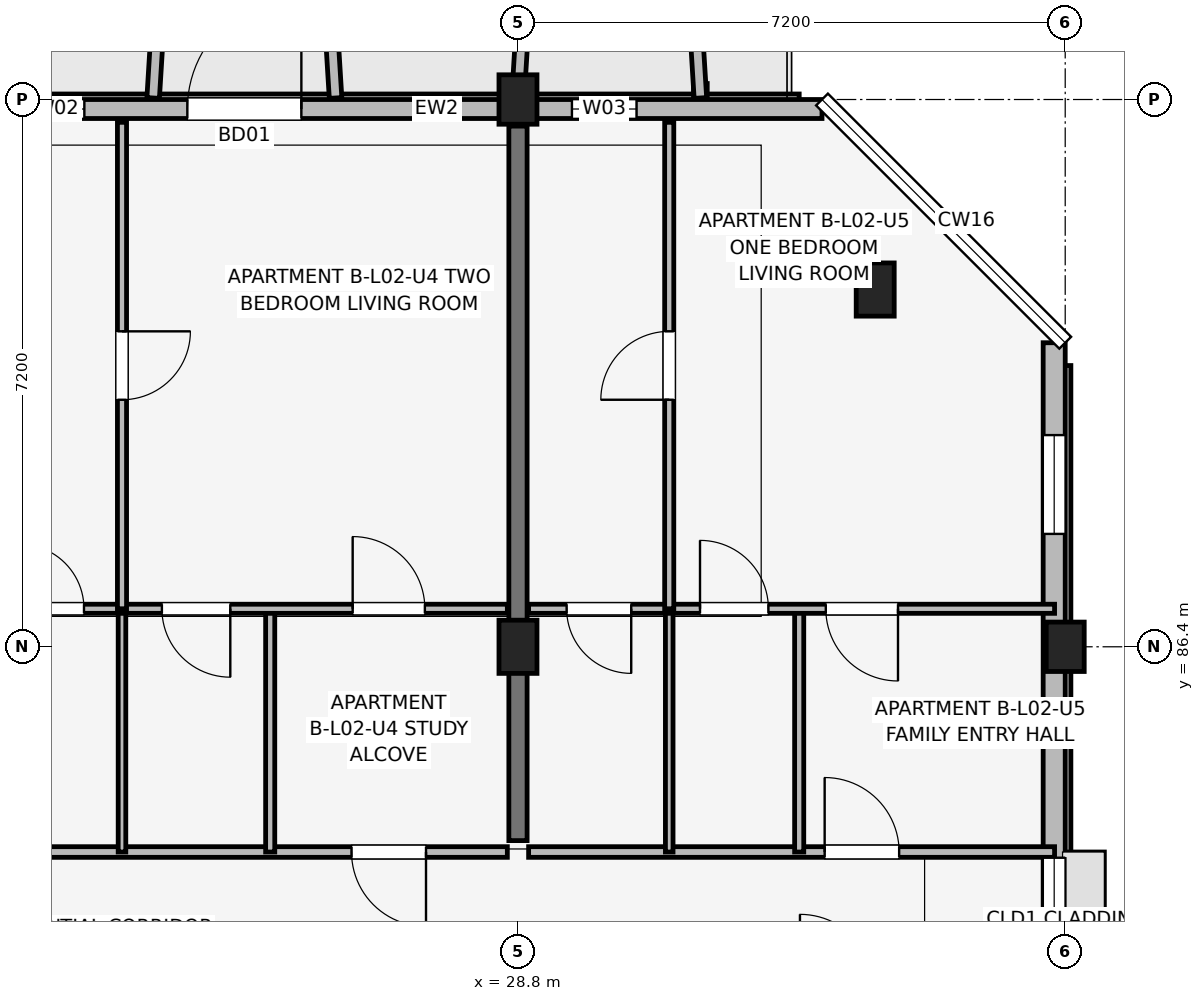
"""IFC4 building model, lengths in metres.
Left out: names, types, materials, properties, quantities, classifications, styles, units other than length and angle.
Written with IfcOpenShell. Run it as: python <this file> out.ifc"""

import sys

from ifc_helpers import new_model, si_unit, direction, frame, frame_2d, origin, origin_2d, place, context, subcontext, project, spatial, rectangle, extrude, element, fill, save


model = new_model("IFC4")
c1 = context("Model", 3, precision=1e-05, world=origin(), true_north=direction((0.0, 1.0)))
c2 = subcontext(c1, "Body", "Model", "MODEL_VIEW")
j1 = project(units=[si_unit("LENGTHUNIT", "METRE"), si_unit("PLANEANGLEUNIT", "RADIAN")], contexts=[c1])
p1 = place(None, origin())
s1 = spatial("IfcSite", under=j1, at=p1, CompositionType="ELEMENT")
p2 = place(p1, origin())
s2 = spatial("IfcBuilding", under=s1, at=p2, CompositionType="ELEMENT")
p3 = place(p2, frame((0.0, 0.0, 8.7)))
s3 = spatial("IfcBuildingStorey", under=s2, at=p3, CompositionType="ELEMENT", Elevation=8.7)
p4 = place(p3, frame((28.8, 86.4, 0.0), z_axis=(0.0, 0.0, 1.0), x_axis=(1.0, 0.0, 0.0)))
e1 = element("IfcColumn", 1, at=p4, inside=s3, PredefinedType="COLUMN", context=c2, shape_type="SweptSolid", body=[
    extrude(rectangle(XDim=0.5, YDim=0.7, at=origin_2d()), origin(), (0.0, 0.0, 1.0), 3.15),
])
for number, where, z_axis, x_axis in (
    (2, (28.8, 93.6, 0.0), (0.0, 0.0, 1.0), (1.0, 0.0, 0.0)),
    (3, (36.0, 86.4, 0.0), (0.0, 0.0, 1.0), (1.0, 0.0, 0.0)),
):
    element("IfcColumn", number, at=place(p3, frame(where, z_axis=z_axis, x_axis=x_axis)), inside=s3, PredefinedType="COLUMN", context=c2, shape_type="SweptSolid", body=[
        extrude(rectangle(XDim=0.5, YDim=0.65, at=origin_2d()), origin(), (0.0, 0.0, 1.0), 3.15),
    ])
p5 = place(p3, frame((33.5, 91.1, 0.0), z_axis=(0.0, 0.0, 1.0), x_axis=(1.0, 0.0, 0.0)))
e4 = element("IfcColumn", 4, at=p5, inside=s3, PredefinedType="COLUMN", context=c2, shape_type="SweptSolid", body=[
    extrude(rectangle(XDim=0.5, YDim=0.7, at=origin_2d()), origin(), (0.0, 0.0, 1.0), 3.15),
])
p6 = place(p3, frame((28.8, 83.85, 0.0), z_axis=(0.0, 0.0, 1.0), x_axis=(0.0, 1.0, 0.0)))
e5 = element("IfcWall", 5, at=p6, inside=s3, PredefinedType="SHEAR", context=c2, shape_type="SweptSolid", body=[
    extrude(rectangle(XDim=9.4, YDim=0.24, at=frame_2d((4.7, 0.0))), origin(), (0.0, 0.0, 1.0), 3.15),
])
p7 = place(p3, frame((35.855, 75.2, 0.0), z_axis=(0.0, 0.0, 1.0), x_axis=(0.0, 1.0, 0.0)))
e6 = element("IfcWall", 6, at=p7, inside=s3, PredefinedType="SOLIDWALL", context=c2, shape_type="SweptSolid", body=[
    extrude(rectangle(XDim=15.2, YDim=0.29, at=frame_2d((7.6, 0.0))), origin(), (0.0, 0.0, 1.0), 2.38),
])
p8 = place(p7, frame((6.775, 0.0, 1.05)))
e7 = element("IfcOpeningElement", 7, at=p8, cuts=e6, PredefinedType="OPENING", context=c2, shape_type="SweptSolid", body=[
    extrude(rectangle(XDim=1.65, YDim=1.15, at=frame_2d((0.825, 0.575))), frame((0.0, 0.155, 0.0), z_axis=(0.0, -1.0, 0.0), x_axis=(1.0, 0.0, 0.0)), (0.0, 0.0, 1.0), 0.31),
])
p9 = place(p7, frame((12.685, 0.0, 0.72)))
e8 = element("IfcOpeningElement", 8, at=p9, cuts=e6, PredefinedType="OPENING", context=c2, shape_type="SweptSolid", body=[
    extrude(rectangle(XDim=1.3, YDim=1.55, at=frame_2d((0.65, 0.775))), frame((0.0, 0.155, 0.0), z_axis=(0.0, -1.0, 0.0), x_axis=(1.0, 0.0, 0.0)), (0.0, 0.0, 1.0), 0.31),
])
p10 = place(p3, frame((32.8, 93.475, 0.0), z_axis=(0.0, 0.0, 1.0), x_axis=(-1.0, 0.0, 0.0)))
e9 = element("IfcWall", 9, at=p10, inside=s3, PredefinedType="SOLIDWALL", context=c2, shape_type="SweptSolid", body=[
    extrude(rectangle(XDim=29.6, YDim=0.25, at=frame_2d((14.8, 0.0))), origin(), (0.0, 0.0, 1.0), 2.43),
])
p11 = place(p10, frame((22.825, 0.0, 0.0), z_axis=(0.0, 0.0, 1.0), x_axis=(-1.0, 0.0, 0.0)))
e10 = element("IfcOpeningElement", 10, at=p11, cuts=e9, PredefinedType="OPENING", context=c2, shape_type="SweptSolid", body=[
    extrude(rectangle(XDim=1.65, YDim=2.15, at=frame_2d((0.825, 1.075))), frame((0.0, 0.135, 0.0), z_axis=(0.0, -1.0, 0.0), x_axis=(1.0, 0.0, 0.0)), (0.0, 0.0, 1.0), 0.27),
])
p12 = place(p10, frame((8.35, 0.0, 0.0), z_axis=(0.0, 0.0, 1.0), x_axis=(-1.0, 0.0, 0.0)))
e11 = element("IfcOpeningElement", 11, at=p12, cuts=e9, PredefinedType="OPENING", context=c2, shape_type="SweptSolid", body=[
    extrude(rectangle(XDim=1.5, YDim=2.15, at=frame_2d((0.75, 1.075))), frame((0.0, 0.135, 0.0), z_axis=(0.0, -1.0, 0.0), x_axis=(1.0, 0.0, 0.0)), (0.0, 0.0, 1.0), 0.27),
])
p13 = place(p10, frame((26.025, 0.0, 0.75)))
e12 = element("IfcOpeningElement", 12, at=p13, cuts=e9, PredefinedType="OPENING", context=c2, shape_type="SweptSolid", body=[
    extrude(rectangle(XDim=1.22, YDim=1.5, at=frame_2d((0.61, 0.75))), frame((0.0, 0.135, 0.0), z_axis=(0.0, -1.0, 0.0), x_axis=(1.0, 0.0, 0.0)), (0.0, 0.0, 1.0), 0.27),
])
p14 = place(p10, frame((23.795, 0.0, 0.75)))
e13 = element("IfcOpeningElement", 13, at=p14, cuts=e9, PredefinedType="OPENING", context=c2, shape_type="SweptSolid", body=[
    extrude(rectangle(XDim=1.34, YDim=1.55, at=frame_2d((0.67, 0.775))), frame((0.0, 0.135, 0.0), z_axis=(0.0, -1.0, 0.0), x_axis=(1.0, 0.0, 0.0)), (0.0, 0.0, 1.0), 0.27),
])
p15 = place(p10, frame((16.265, 0.0, 0.7)))
e14 = element("IfcOpeningElement", 14, at=p15, cuts=e9, PredefinedType="OPENING", context=c2, shape_type="SweptSolid", body=[
    extrude(rectangle(XDim=1.58, YDim=1.6, at=frame_2d((0.79, 0.8))), frame((0.0, 0.135, 0.0), z_axis=(0.0, -1.0, 0.0), x_axis=(1.0, 0.0, 0.0)), (0.0, 0.0, 1.0), 0.27),
])
p16 = place(p10, frame((12.245, 0.0, 0.75)))
e15 = element("IfcOpeningElement", 15, at=p16, cuts=e9, PredefinedType="OPENING", context=c2, shape_type="SweptSolid", body=[
    extrude(rectangle(XDim=0.6, YDim=1.25, at=frame_2d((0.3, 0.625))), frame((0.0, 0.135, 0.0), z_axis=(0.0, -1.0, 0.0), x_axis=(1.0, 0.0, 0.0)), (0.0, 0.0, 1.0), 0.27),
])
p17 = place(p10, frame((9.705, 0.0, 0.75)))
e16 = element("IfcOpeningElement", 16, at=p17, cuts=e9, PredefinedType="OPENING", context=c2, shape_type="SweptSolid", body=[
    extrude(rectangle(XDim=0.72, YDim=1.35, at=frame_2d((0.36, 0.675))), frame((0.0, 0.135, 0.0), z_axis=(0.0, -1.0, 0.0), x_axis=(1.0, 0.0, 0.0)), (0.0, 0.0, 1.0), 0.27),
])
p18 = place(p10, frame((2.44, 0.0, 0.75)))
e17 = element("IfcOpeningElement", 17, at=p18, cuts=e9, PredefinedType="OPENING", context=c2, shape_type="SweptSolid", body=[
    extrude(rectangle(XDim=0.85, YDim=1.4, at=frame_2d((0.425, 0.7))), frame((0.0, 0.135, 0.0), z_axis=(0.0, -1.0, 0.0), x_axis=(1.0, 0.0, 0.0)), (0.0, 0.0, 1.0), 0.27),
])
for number, where, z_axis, x_axis in (
    (18, (24.0, 93.62, 0.0), (0.0, 0.0, 1.0), (0.061, 0.998, 0.0)),
    (19, (26.4, 93.62, 0.0), (0.0, 0.0, 1.0), (-0.061, 0.998, 0.0)),
):
    element("IfcWall", number, at=place(p3, frame(where, z_axis=z_axis, x_axis=x_axis)), inside=s3, PredefinedType="ELEMENTEDWALL", context=c2, shape_type="SweptSolid", body=[
        extrude(rectangle(XDim=1.964, YDim=0.165, at=frame_2d((0.982, 0.0))), origin(), (0.0, 0.0, 1.0), 2.45),
    ])
for number, where, z_axis, x_axis in (
    (20, (28.8, 93.62, 0.0), (0.0, 0.0, 1.0), (0.061, 0.998, 0.0)),
    (21, (31.2, 93.62, 0.0), (0.0, 0.0, 1.0), (-0.061, 0.998, 0.0)),
):
    element("IfcWall", number, at=place(p3, frame(where, z_axis=z_axis, x_axis=x_axis)), inside=s3, PredefinedType="ELEMENTEDWALL", context=c2, shape_type="SweptSolid", body=[
        extrude(rectangle(XDim=1.964, YDim=0.165, at=frame_2d((0.982, 0.0))), origin(), (0.0, 0.0, 1.0), 2.95),
    ])
p19 = place(p3, frame((21.74, 83.7, 0.0), z_axis=(0.0, 0.0, 1.0), x_axis=(1.0, 0.0, 0.0)))
e22 = element("IfcWall", 22, at=p19, inside=s3, PredefinedType="PARTITIONING", context=c2, shape_type="SweptSolid", body=[
    extrude(rectangle(XDim=6.92, YDim=0.14, at=frame_2d((3.46, 0.0))), origin(), (0.0, 0.0, 1.0), 2.38),
])
p20 = place(p19, frame((5.85, 0.0, 0.0), z_axis=(0.0, 0.0, 1.0), x_axis=(-1.0, 0.0, 0.0)))
e23 = element("IfcOpeningElement", 23, at=p20, cuts=e22, PredefinedType="OPENING", context=c2, shape_type="SweptSolid", body=[
    extrude(rectangle(XDim=0.98, YDim=2.1, at=frame_2d((0.49, 1.05))), frame((0.0, 0.08, 0.0), z_axis=(0.0, -1.0, 0.0), x_axis=(1.0, 0.0, 0.0)), (0.0, 0.0, 1.0), 0.16),
])
p21 = place(p3, frame((23.59, 83.7, 0.0), z_axis=(0.0, 0.0, 1.0), x_axis=(0.0, 1.0, 0.0)))
e24 = element("IfcWall", 24, at=p21, inside=s3, PredefinedType="PARTITIONING", context=c2, shape_type="SweptSolid", body=[
    extrude(rectangle(XDim=3.2, YDim=0.1, at=frame_2d((1.6, 0.0))), origin(), (0.0, 0.0, 1.0), 2.375),
])
p22 = place(p3, frame((25.54, 83.7, 0.0), z_axis=(0.0, 0.0, 1.0), x_axis=(0.0, 1.0, 0.0)))
e25 = element("IfcWall", 25, at=p22, inside=s3, PredefinedType="PARTITIONING", context=c2, shape_type="SweptSolid", body=[
    extrude(rectangle(XDim=3.2, YDim=0.12, at=frame_2d((1.6, 0.0))), origin(), (0.0, 0.0, 1.0), 2.375),
])
p23 = place(p3, frame((21.74, 86.9, 0.0), z_axis=(0.0, 0.0, 1.0), x_axis=(1.0, 0.0, 0.0)))
e26 = element("IfcWall", 26, at=p23, inside=s3, PredefinedType="PARTITIONING", context=c2, shape_type="SweptSolid", body=[
    extrude(rectangle(XDim=6.92, YDim=0.12, at=frame_2d((3.46, 0.0))), origin(), (0.0, 0.0, 1.0), 2.38),
])
p24 = place(p23, frame((0.5, 0.0, 0.0)))
e27 = element("IfcOpeningElement", 27, at=p24, cuts=e26, PredefinedType="OPENING", context=c2, shape_type="SweptSolid", body=[
    extrude(rectangle(XDim=0.85, YDim=2.08, at=frame_2d((0.425, 1.04))), frame((0.0, 0.07, 0.0), z_axis=(0.0, -1.0, 0.0), x_axis=(1.0, 0.0, 0.0)), (0.0, 0.0, 1.0), 0.14),
])
p25 = place(p23, frame((3.275, 0.0, 0.0), z_axis=(0.0, 0.0, 1.0), x_axis=(-1.0, 0.0, 0.0)))
e28 = element("IfcOpeningElement", 28, at=p25, cuts=e26, PredefinedType="OPENING", context=c2, shape_type="SweptSolid", body=[
    extrude(rectangle(XDim=0.9, YDim=2.08, at=frame_2d((0.45, 1.04))), frame((0.0, 0.07, 0.0), z_axis=(0.0, -1.0, 0.0), x_axis=(1.0, 0.0, 0.0)), (0.0, 0.0, 1.0), 0.14),
])
p26 = place(p23, frame((4.885, 0.0, 0.0)))
e29 = element("IfcOpeningElement", 29, at=p26, cuts=e26, PredefinedType="OPENING", context=c2, shape_type="SweptSolid", body=[
    extrude(rectangle(XDim=0.95, YDim=2.08, at=frame_2d((0.475, 1.04))), frame((0.0, 0.07, 0.0), z_axis=(0.0, -1.0, 0.0), x_axis=(1.0, 0.0, 0.0)), (0.0, 0.0, 1.0), 0.14),
])
p27 = place(p3, frame((23.59, 86.9, 0.0), z_axis=(0.0, 0.0, 1.0), x_axis=(0.0, 1.0, 0.0)))
e30 = element("IfcWall", 30, at=p27, inside=s3, PredefinedType="PARTITIONING", context=c2, shape_type="SweptSolid", body=[
    extrude(rectangle(XDim=6.4, YDim=0.12, at=frame_2d((3.2, 0.0))), origin(), (0.0, 0.0, 1.0), 2.38),
])
p28 = place(p27, frame((3.65, 0.0, 0.0), z_axis=(0.0, 0.0, 1.0), x_axis=(-1.0, 0.0, 0.0)))
e31 = element("IfcOpeningElement", 31, at=p28, cuts=e30, PredefinedType="OPENING", context=c2, shape_type="SweptSolid", body=[
    extrude(rectangle(XDim=0.9, YDim=2.08, at=frame_2d((0.45, 1.04))), frame((0.0, 0.07, 0.0), z_axis=(0.0, -1.0, 0.0), x_axis=(1.0, 0.0, 0.0)), (0.0, 0.0, 1.0), 0.14),
])
p29 = place(p3, frame((28.94, 83.7, 0.0), z_axis=(0.0, 0.0, 1.0), x_axis=(1.0, 0.0, 0.0)))
e32 = element("IfcWall", 32, at=p29, inside=s3, PredefinedType="PARTITIONING", context=c2, shape_type="SweptSolid", body=[
    extrude(rectangle(XDim=6.92, YDim=0.14, at=frame_2d((3.46, 0.0))), origin(), (0.0, 0.0, 1.0), 2.38),
])
p30 = place(p29, frame((3.895, 0.0, 0.0)))
e33 = element("IfcOpeningElement", 33, at=p30, cuts=e32, PredefinedType="OPENING", context=c2, shape_type="SweptSolid", body=[
    extrude(rectangle(XDim=0.98, YDim=2.1, at=frame_2d((0.49, 1.05))), frame((0.0, 0.08, 0.0), z_axis=(0.0, -1.0, 0.0), x_axis=(1.0, 0.0, 0.0)), (0.0, 0.0, 1.0), 0.16),
])
p31 = place(p3, frame((30.79, 83.7, 0.0), z_axis=(0.0, 0.0, 1.0), x_axis=(0.0, 1.0, 0.0)))
e34 = element("IfcWall", 34, at=p31, inside=s3, PredefinedType="PARTITIONING", context=c2, shape_type="SweptSolid", body=[
    extrude(rectangle(XDim=3.2, YDim=0.1, at=frame_2d((1.6, 0.0))), origin(), (0.0, 0.0, 1.0), 2.375),
])
p32 = place(p3, frame((32.5, 83.7, 0.0), z_axis=(0.0, 0.0, 1.0), x_axis=(0.0, 1.0, 0.0)))
e35 = element("IfcWall", 35, at=p32, inside=s3, PredefinedType="PARTITIONING", context=c2, shape_type="SweptSolid", body=[
    extrude(rectangle(XDim=3.2, YDim=0.12, at=frame_2d((1.6, 0.0))), origin(), (0.0, 0.0, 1.0), 2.375),
])
p33 = place(p3, frame((28.94, 86.9, 0.0), z_axis=(0.0, 0.0, 1.0), x_axis=(1.0, 0.0, 0.0)))
e36 = element("IfcWall", 36, at=p33, inside=s3, PredefinedType="PARTITIONING", context=c2, shape_type="SweptSolid", body=[
    extrude(rectangle(XDim=6.92, YDim=0.12, at=frame_2d((3.46, 0.0))), origin(), (0.0, 0.0, 1.0), 2.38),
])
p34 = place(p33, frame((1.35, 0.0, 0.0), z_axis=(0.0, 0.0, 1.0), x_axis=(-1.0, 0.0, 0.0)))
e37 = element("IfcOpeningElement", 37, at=p34, cuts=e36, PredefinedType="OPENING", context=c2, shape_type="SweptSolid", body=[
    extrude(rectangle(XDim=0.85, YDim=2.08, at=frame_2d((0.425, 1.04))), frame((0.0, 0.07, 0.0), z_axis=(0.0, -1.0, 0.0), x_axis=(1.0, 0.0, 0.0)), (0.0, 0.0, 1.0), 0.14),
])
p35 = place(p33, frame((2.255, 0.0, 0.0)))
e38 = element("IfcOpeningElement", 38, at=p35, cuts=e36, PredefinedType="OPENING", context=c2, shape_type="SweptSolid", body=[
    extrude(rectangle(XDim=0.9, YDim=2.08, at=frame_2d((0.45, 1.04))), frame((0.0, 0.07, 0.0), z_axis=(0.0, -1.0, 0.0), x_axis=(1.0, 0.0, 0.0)), (0.0, 0.0, 1.0), 0.14),
])
p36 = place(p33, frame((4.86, 0.0, 0.0), z_axis=(0.0, 0.0, 1.0), x_axis=(-1.0, 0.0, 0.0)))
e39 = element("IfcOpeningElement", 39, at=p36, cuts=e36, PredefinedType="OPENING", context=c2, shape_type="SweptSolid", body=[
    extrude(rectangle(XDim=0.95, YDim=2.08, at=frame_2d((0.475, 1.04))), frame((0.0, 0.07, 0.0), z_axis=(0.0, -1.0, 0.0), x_axis=(1.0, 0.0, 0.0)), (0.0, 0.0, 1.0), 0.14),
])
p37 = place(p3, frame((30.79, 86.9, 0.0), z_axis=(0.0, 0.0, 1.0), x_axis=(0.0, 1.0, 0.0)))
e40 = element("IfcWall", 40, at=p37, inside=s3, PredefinedType="PARTITIONING", context=c2, shape_type="SweptSolid", body=[
    extrude(rectangle(XDim=6.4, YDim=0.12, at=frame_2d((3.2, 0.0))), origin(), (0.0, 0.0, 1.0), 2.38),
])
p38 = place(p37, frame((2.75, 0.0, 0.0)))
e41 = element("IfcOpeningElement", 41, at=p38, cuts=e40, PredefinedType="OPENING", context=c2, shape_type="SweptSolid", body=[
    extrude(rectangle(XDim=0.9, YDim=2.08, at=frame_2d((0.45, 1.04))), frame((0.0, 0.07, 0.0), z_axis=(0.0, -1.0, 0.0), x_axis=(1.0, 0.0, 0.0)), (0.0, 0.0, 1.0), 0.14),
])
p39 = place(p12, origin())
e42 = element("IfcDoor", 42, at=p39, inside=s3, OperationType="SINGLE_SWING_LEFT", PredefinedType="DOOR", context=c2, shape_type="SweptSolid", body=[
    extrude(rectangle(XDim=1.5, YDim=2.15, at=frame_2d((0.75, 1.075))), frame((0.0, 0.025, 0.0), z_axis=(0.0, -1.0, 0.0), x_axis=(1.0, 0.0, 0.0)), (0.0, 0.0, 1.0), 0.05),
])
fill(e11, e42)
p40 = place(p17, origin())
e43 = element("IfcWindow", 43, at=p40, inside=s3, PartitioningType="SINGLE_PANEL", PredefinedType="WINDOW", context=c2, shape_type="SweptSolid", body=[
    extrude(rectangle(XDim=0.72, YDim=1.35, at=frame_2d((0.36, 0.675))), frame((0.0, 0.03, 0.0), z_axis=(0.0, -1.0, 0.0), x_axis=(1.0, 0.0, 0.0)), (0.0, 0.0, 1.0), 0.06),
])
fill(e16, e43)
p41 = place(p18, origin())
e44 = element("IfcWindow", 44, at=p41, inside=s3, PartitioningType="SINGLE_PANEL", PredefinedType="WINDOW", context=c2, shape_type="SweptSolid", body=[
    extrude(rectangle(XDim=0.85, YDim=1.4, at=frame_2d((0.425, 0.7))), frame((0.0, 0.03, 0.0), z_axis=(0.0, -1.0, 0.0), x_axis=(1.0, 0.0, 0.0)), (0.0, 0.0, 1.0), 0.06),
])
fill(e17, e44)
p42 = place(p8, origin())
e45 = element("IfcWindow", 45, at=p42, inside=s3, PartitioningType="SINGLE_PANEL", PredefinedType="WINDOW", context=c2, shape_type="SweptSolid", body=[
    extrude(rectangle(XDim=1.65, YDim=1.15, at=frame_2d((0.825, 0.575))), frame((0.0, 0.03, 0.0), z_axis=(0.0, -1.0, 0.0), x_axis=(1.0, 0.0, 0.0)), (0.0, 0.0, 1.0), 0.06),
])
fill(e7, e45)
p43 = place(p9, origin())
e46 = element("IfcWindow", 46, at=p43, inside=s3, PartitioningType="SINGLE_PANEL", PredefinedType="WINDOW", context=c2, shape_type="SweptSolid", body=[
    extrude(rectangle(XDim=1.3, YDim=1.55, at=frame_2d((0.65, 0.775))), frame((0.0, 0.03, 0.0), z_axis=(0.0, -1.0, 0.0), x_axis=(1.0, 0.0, 0.0)), (0.0, 0.0, 1.0), 0.06),
])
fill(e8, e46)
p44 = place(p20, origin())
e47 = element("IfcDoor", 47, at=p44, inside=s3, OperationType="SINGLE_SWING_RIGHT", PredefinedType="DOOR", context=c2, shape_type="SweptSolid", body=[
    extrude(rectangle(XDim=0.98, YDim=2.1, at=frame_2d((0.49, 1.05))), frame((0.0, 0.025, 0.0), z_axis=(0.0, -1.0, 0.0), x_axis=(1.0, 0.0, 0.0)), (0.0, 0.0, 1.0), 0.05),
])
fill(e23, e47)
p45 = place(p24, origin())
e48 = element("IfcDoor", 48, at=p45, inside=s3, OperationType="SINGLE_SWING_LEFT", PredefinedType="DOOR", context=c2, shape_type="SweptSolid", body=[
    extrude(rectangle(XDim=0.85, YDim=2.08, at=frame_2d((0.425, 1.04))), frame((0.0, 0.025, 0.0), z_axis=(0.0, -1.0, 0.0), x_axis=(1.0, 0.0, 0.0)), (0.0, 0.0, 1.0), 0.05),
])
fill(e27, e48)
p46 = place(p25, origin())
e49 = element("IfcDoor", 49, at=p46, inside=s3, OperationType="SINGLE_SWING_RIGHT", PredefinedType="DOOR", context=c2, shape_type="SweptSolid", body=[
    extrude(rectangle(XDim=0.9, YDim=2.08, at=frame_2d((0.45, 1.04))), frame((0.0, 0.025, 0.0), z_axis=(0.0, -1.0, 0.0), x_axis=(1.0, 0.0, 0.0)), (0.0, 0.0, 1.0), 0.05),
])
fill(e28, e49)
p47 = place(p26, origin())
e50 = element("IfcDoor", 50, at=p47, inside=s3, OperationType="SINGLE_SWING_LEFT", PredefinedType="DOOR", context=c2, shape_type="SweptSolid", body=[
    extrude(rectangle(XDim=0.95, YDim=2.08, at=frame_2d((0.475, 1.04))), frame((0.0, 0.025, 0.0), z_axis=(0.0, -1.0, 0.0), x_axis=(1.0, 0.0, 0.0)), (0.0, 0.0, 1.0), 0.05),
])
fill(e29, e50)
p48 = place(p28, origin())
e51 = element("IfcDoor", 51, at=p48, inside=s3, OperationType="SINGLE_SWING_RIGHT", PredefinedType="DOOR", context=c2, shape_type="SweptSolid", body=[
    extrude(rectangle(XDim=0.9, YDim=2.08, at=frame_2d((0.45, 1.04))), frame((0.0, 0.025, 0.0), z_axis=(0.0, -1.0, 0.0), x_axis=(1.0, 0.0, 0.0)), (0.0, 0.0, 1.0), 0.05),
])
fill(e31, e51)
p49 = place(p30, origin())
e52 = element("IfcDoor", 52, at=p49, inside=s3, OperationType="SINGLE_SWING_LEFT", PredefinedType="DOOR", context=c2, shape_type="SweptSolid", body=[
    extrude(rectangle(XDim=0.98, YDim=2.1, at=frame_2d((0.49, 1.05))), frame((0.0, 0.025, 0.0), z_axis=(0.0, -1.0, 0.0), x_axis=(1.0, 0.0, 0.0)), (0.0, 0.0, 1.0), 0.05),
])
fill(e33, e52)
p50 = place(p34, origin())
e53 = element("IfcDoor", 53, at=p50, inside=s3, OperationType="SINGLE_SWING_RIGHT", PredefinedType="DOOR", context=c2, shape_type="SweptSolid", body=[
    extrude(rectangle(XDim=0.85, YDim=2.08, at=frame_2d((0.425, 1.04))), frame((0.0, 0.025, 0.0), z_axis=(0.0, -1.0, 0.0), x_axis=(1.0, 0.0, 0.0)), (0.0, 0.0, 1.0), 0.05),
])
fill(e37, e53)
p51 = place(p35, origin())
e54 = element("IfcDoor", 54, at=p51, inside=s3, OperationType="SINGLE_SWING_LEFT", PredefinedType="DOOR", context=c2, shape_type="SweptSolid", body=[
    extrude(rectangle(XDim=0.9, YDim=2.08, at=frame_2d((0.45, 1.04))), frame((0.0, 0.025, 0.0), z_axis=(0.0, -1.0, 0.0), x_axis=(1.0, 0.0, 0.0)), (0.0, 0.0, 1.0), 0.05),
])
fill(e38, e54)
p52 = place(p36, origin())
e55 = element("IfcDoor", 55, at=p52, inside=s3, OperationType="SINGLE_SWING_RIGHT", PredefinedType="DOOR", context=c2, shape_type="SweptSolid", body=[
    extrude(rectangle(XDim=0.95, YDim=2.08, at=frame_2d((0.475, 1.04))), frame((0.0, 0.025, 0.0), z_axis=(0.0, -1.0, 0.0), x_axis=(1.0, 0.0, 0.0)), (0.0, 0.0, 1.0), 0.05),
])
fill(e39, e55)
p53 = place(p38, origin())
e56 = element("IfcDoor", 56, at=p53, inside=s3, OperationType="SINGLE_SWING_LEFT", PredefinedType="DOOR", context=c2, shape_type="SweptSolid", body=[
    extrude(rectangle(XDim=0.9, YDim=2.08, at=frame_2d((0.45, 1.04))), frame((0.0, 0.025, 0.0), z_axis=(0.0, -1.0, 0.0), x_axis=(1.0, 0.0, 0.0)), (0.0, 0.0, 1.0), 0.05),
])
fill(e41, e56)
save(model, sys.argv[1])
